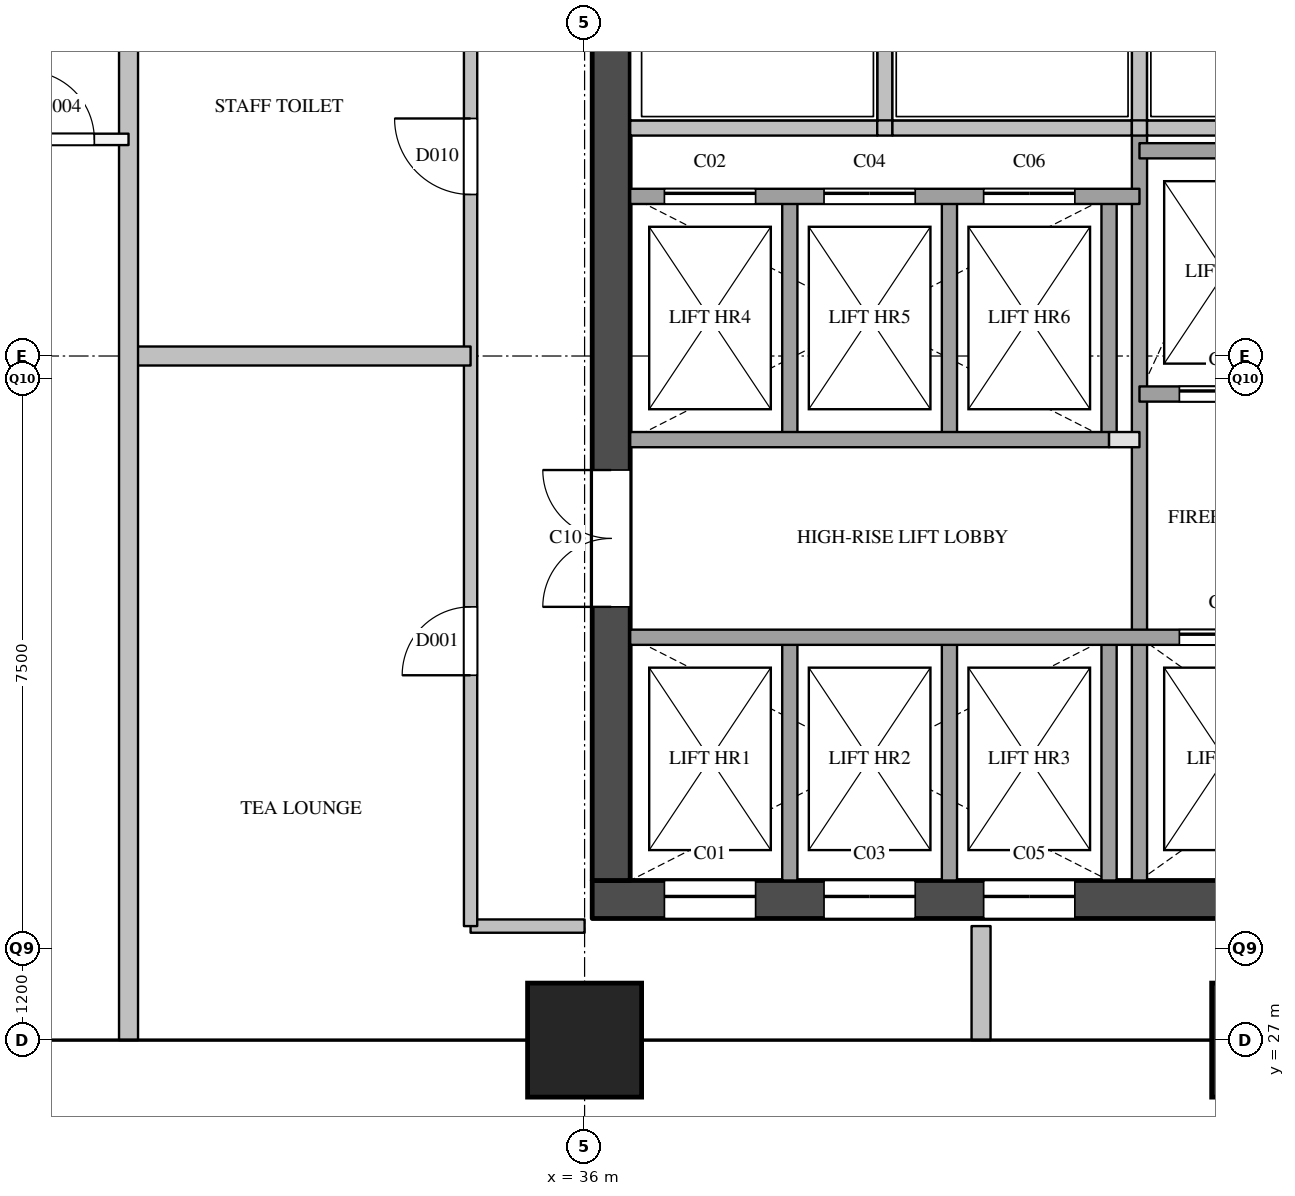
"""IFC4 building model, lengths in metres.
Left out: names, types, materials, properties, quantities, classifications, styles, units other than length and angle.
Written with IfcOpenShell. Run it as: python <this file> out.ifc"""

import sys

from ifc_helpers import new_model, si_unit, direction, frame, frame_2d, origin, origin_2d, place, context, subcontext, project, spatial, rectangle, extrude, element, fill, save


model = new_model("IFC4")
c1 = context("Model", 3, precision=1e-05, world=origin(), true_north=direction((0.0, 1.0)))
c2 = subcontext(c1, "Body", "Model", "MODEL_VIEW")
j1 = project(units=[si_unit("LENGTHUNIT", "METRE"), si_unit("PLANEANGLEUNIT", "RADIAN")], contexts=[c1])
p1 = place(None, origin())
s1 = spatial("IfcSite", under=j1, at=p1, CompositionType="ELEMENT")
p2 = place(p1, origin())
s2 = spatial("IfcBuilding", under=s1, at=p2, CompositionType="ELEMENT")
p3 = place(p2, frame((0.0, 0.0, 150.5)))
s3 = spatial("IfcBuildingStorey", under=s2, at=p3, CompositionType="ELEMENT", Elevation=150.5)
for number, where, z_axis, x_axis in (
    (1, (36.0, 27.0, 0.0), (0.0, 0.0, 1.0), (1.0, 0.0, 0.0)),
    (2, (45.0, 27.0, 0.0), (0.0, 0.0, 1.0), (1.0, 0.0, 0.0)),
):
    element("IfcColumn", number, at=place(p3, frame(where, z_axis=z_axis, x_axis=x_axis)), inside=s3, PredefinedType="COLUMN", context=c2, shape_type="SweptSolid", body=[
        extrude(rectangle(XDim=1.5, YDim=1.5, at=origin_2d()), origin(), (0.0, 0.0, 1.0), 3.9),
    ])
p4 = place(p3, frame((36.1, 28.85, 0.0), z_axis=(0.0, 0.0, 1.0), x_axis=(1.0, 0.0, 0.0)))
e3 = element("IfcWall", 3, at=p4, inside=s3, PredefinedType="SHEAR", context=c2, shape_type="SweptSolid", body=[
    extrude(rectangle(XDim=12.2, YDim=0.5, at=frame_2d((6.1, 0.0))), origin(), (0.0, 0.0, 1.0), 3.6),
])
p5 = place(p4, frame((0.95, 0.0, 0.0)))
e4 = element("IfcOpeningElement", 4, at=p5, cuts=e3, PredefinedType="OPENING", context=c2, shape_type="SweptSolid", body=[
    extrude(rectangle(XDim=1.2, YDim=2.1, at=frame_2d((0.6, 1.05))), frame((0.0, 0.26, 0.0), z_axis=(0.0, -1.0, 0.0), x_axis=(1.0, 0.0, 0.0)), (0.0, 0.0, 1.0), 0.52),
])
p6 = place(p4, frame((3.05, 0.0, 0.0)))
e5 = element("IfcOpeningElement", 5, at=p6, cuts=e3, PredefinedType="OPENING", context=c2, shape_type="SweptSolid", body=[
    extrude(rectangle(XDim=1.2, YDim=2.1, at=frame_2d((0.6, 1.05))), frame((0.0, 0.26, 0.0), z_axis=(0.0, -1.0, 0.0), x_axis=(1.0, 0.0, 0.0)), (0.0, 0.0, 1.0), 0.52),
])
p7 = place(p4, frame((5.15, 0.0, 0.0)))
e6 = element("IfcOpeningElement", 6, at=p7, cuts=e3, PredefinedType="OPENING", context=c2, shape_type="SweptSolid", body=[
    extrude(rectangle(XDim=1.2, YDim=2.1, at=frame_2d((0.6, 1.05))), frame((0.0, 0.26, 0.0), z_axis=(0.0, -1.0, 0.0), x_axis=(1.0, 0.0, 0.0)), (0.0, 0.0, 1.0), 0.52),
])
p8 = place(p3, frame((36.35, 29.1, 0.0), z_axis=(0.0, 0.0, 1.0), x_axis=(0.0, 1.0, 0.0)))
e7 = element("IfcWall", 7, at=p8, inside=s3, PredefinedType="SHEAR", context=c2, shape_type="SweptSolid", body=[
    extrude(rectangle(XDim=20.3, YDim=0.5, at=frame_2d((10.15, 0.0))), origin(), (0.0, 0.0, 1.0), 3.6),
])
p9 = place(p8, frame((3.6, 0.0, 0.0)))
e8 = element("IfcOpeningElement", 8, at=p9, cuts=e7, PredefinedType="OPENING", context=c2, shape_type="SweptSolid", body=[
    extrude(rectangle(XDim=1.8, YDim=2.1, at=frame_2d((0.9, 1.05))), frame((0.0, 0.26, 0.0), z_axis=(0.0, -1.0, 0.0), x_axis=(1.0, 0.0, 0.0)), (0.0, 0.0, 1.0), 0.52),
])
p10 = place(p8, frame((16.4, 0.0, 0.0)))
e9 = element("IfcOpeningElement", 9, at=p10, cuts=e7, PredefinedType="OPENING", context=c2, shape_type="SweptSolid", body=[
    extrude(rectangle(XDim=1.0, YDim=2.1, at=frame_2d((0.5, 1.05))), frame((0.0, 0.26, 0.0), z_axis=(0.0, -1.0, 0.0), x_axis=(1.0, 0.0, 0.0)), (0.0, 0.0, 1.0), 0.52),
])
p11 = place(p3, frame((38.7, 29.1, 0.0), z_axis=(0.0, 0.0, 1.0), x_axis=(0.0, 1.0, 0.0)))
e10 = element("IfcWall", 10, at=p11, inside=s3, PredefinedType="SOLIDWALL", context=c2, shape_type="SweptSolid", body=[
    extrude(rectangle(XDim=3.2, YDim=0.2, at=frame_2d((1.6, 0.0))), origin(), (0.0, 0.0, 1.0), 3.6),
])
p12 = place(p3, frame((38.7, 34.9, 0.0), z_axis=(0.0, 0.0, 1.0), x_axis=(0.0, 1.0, 0.0)))
e11 = element("IfcWall", 11, at=p12, inside=s3, PredefinedType="SOLIDWALL", context=c2, shape_type="SweptSolid", body=[
    extrude(rectangle(XDim=3.2, YDim=0.2, at=frame_2d((1.6, 0.0))), origin(), (0.0, 0.0, 1.0), 3.6),
])
p13 = place(p3, frame((39.95, 39.0, 0.0), z_axis=(0.0, 0.0, 1.0), x_axis=(0.0, 1.0, 0.0)))
e12 = element("IfcWall", 12, at=p13, inside=s3, PredefinedType="SOLIDWALL", context=c2, shape_type="SweptSolid", body=[
    extrude(rectangle(XDim=1.78, YDim=0.2, at=frame_2d((0.89, 0.0))), origin(), (0.0, 0.0, 1.0), 3.6),
])
p14 = place(p3, frame((40.8, 29.1, 0.0), z_axis=(0.0, 0.0, 1.0), x_axis=(0.0, 1.0, 0.0)))
e13 = element("IfcWall", 13, at=p14, inside=s3, PredefinedType="SOLIDWALL", context=c2, shape_type="SweptSolid", body=[
    extrude(rectangle(XDim=3.2, YDim=0.2, at=frame_2d((1.6, 0.0))), origin(), (0.0, 0.0, 1.0), 3.6),
])
p15 = place(p3, frame((40.8, 34.9, 0.0), z_axis=(0.0, 0.0, 1.0), x_axis=(0.0, 1.0, 0.0)))
e14 = element("IfcWall", 14, at=p15, inside=s3, PredefinedType="SOLIDWALL", context=c2, shape_type="SweptSolid", body=[
    extrude(rectangle(XDim=3.2, YDim=0.2, at=frame_2d((1.6, 0.0))), origin(), (0.0, 0.0, 1.0), 3.6),
])
p16 = place(p3, frame((42.9, 29.1, 0.0), z_axis=(0.0, 0.0, 1.0), x_axis=(0.0, 1.0, 0.0)))
e15 = element("IfcWall", 15, at=p16, inside=s3, PredefinedType="SOLIDWALL", context=c2, shape_type="SweptSolid", body=[
    extrude(rectangle(XDim=3.2, YDim=0.2, at=frame_2d((1.6, 0.0))), origin(), (0.0, 0.0, 1.0), 3.6),
])
p17 = place(p3, frame((42.9, 34.9, 0.0), z_axis=(0.0, 0.0, 1.0), x_axis=(0.0, 1.0, 0.0)))
e16 = element("IfcWall", 16, at=p17, inside=s3, PredefinedType="SOLIDWALL", context=c2, shape_type="SweptSolid", body=[
    extrude(rectangle(XDim=3.2, YDim=0.2, at=frame_2d((1.6, 0.0))), origin(), (0.0, 0.0, 1.0), 3.6),
])
p18 = place(p3, frame((43.3, 29.1, 0.0), z_axis=(0.0, 0.0, 1.0), x_axis=(0.0, 1.0, 0.0)))
e17 = element("IfcWall", 17, at=p18, inside=s3, PredefinedType="SOLIDWALL", context=c2, shape_type="SweptSolid", body=[
    extrude(rectangle(XDim=9.9, YDim=0.2, at=frame_2d((4.95, 0.0))), origin(), (0.0, 0.0, 1.0), 3.6),
])
p19 = place(p3, frame((43.3, 39.0, 0.0), z_axis=(0.0, 0.0, 1.0), x_axis=(0.0, 1.0, 0.0)))
e18 = element("IfcWall", 18, at=p19, inside=s3, PredefinedType="SOLIDWALL", context=c2, shape_type="SweptSolid", body=[
    extrude(rectangle(XDim=1.78, YDim=0.2, at=frame_2d((0.89, 0.0))), origin(), (0.0, 0.0, 1.0), 3.6),
])
p20 = place(p3, frame((36.6, 32.3, 0.0), z_axis=(0.0, 0.0, 1.0), x_axis=(1.0, 0.0, 0.0)))
e19 = element("IfcWall", 19, at=p20, inside=s3, PredefinedType="SOLIDWALL", context=c2, shape_type="SweptSolid", body=[
    extrude(rectangle(XDim=11.2, YDim=0.2, at=frame_2d((5.6, 0.0))), origin(), (0.0, 0.0, 1.0), 3.6),
])
p21 = place(p20, frame((7.225, 0.0, 0.0)))
e20 = element("IfcOpeningElement", 20, at=p21, cuts=e19, PredefinedType="OPENING", context=c2, shape_type="SweptSolid", body=[
    extrude(rectangle(XDim=1.2, YDim=2.1, at=frame_2d((0.6, 1.05))), frame((0.0, 0.11, 0.0), z_axis=(0.0, -1.0, 0.0), x_axis=(1.0, 0.0, 0.0)), (0.0, 0.0, 1.0), 0.22),
])
p22 = place(p20, frame((9.475, 0.0, 0.0)))
e21 = element("IfcOpeningElement", 21, at=p22, cuts=e19, PredefinedType="OPENING", context=c2, shape_type="SweptSolid", body=[
    extrude(rectangle(XDim=1.2, YDim=2.1, at=frame_2d((0.6, 1.05))), frame((0.0, 0.11, 0.0), z_axis=(0.0, -1.0, 0.0), x_axis=(1.0, 0.0, 0.0)), (0.0, 0.0, 1.0), 0.22),
])
p23 = place(p3, frame((42.9, 34.9, 0.0), z_axis=(0.0, 0.0, 1.0), x_axis=(1.0, 0.0, 0.0)))
e22 = element("IfcWall", 22, at=p23, inside=s3, PredefinedType="PARTITIONING", context=c2, shape_type="SweptSolid", body=[
    extrude(rectangle(XDim=0.4, YDim=0.2, at=frame_2d((0.2, 0.0))), origin(), (0.0, 0.0, 1.0), 3.6),
])
p24 = place(p3, frame((36.6, 34.9, 0.0), z_axis=(0.0, 0.0, 1.0), x_axis=(1.0, 0.0, 0.0)))
e23 = element("IfcWall", 23, at=p24, inside=s3, PredefinedType="SOLIDWALL", context=c2, shape_type="SweptSolid", body=[
    extrude(rectangle(XDim=6.3, YDim=0.2, at=frame_2d((3.15, 0.0))), origin(), (0.0, 0.0, 1.0), 3.6),
])
p25 = place(p3, frame((43.3, 35.5, 0.0), z_axis=(0.0, 0.0, 1.0), x_axis=(1.0, 0.0, 0.0)))
e24 = element("IfcWall", 24, at=p25, inside=s3, PredefinedType="SOLIDWALL", context=c2, shape_type="SweptSolid", body=[
    extrude(rectangle(XDim=4.5, YDim=0.2, at=frame_2d((2.25, 0.0))), origin(), (0.0, 0.0, 1.0), 3.6),
])
p26 = place(p25, frame((0.525, 0.0, 0.0)))
e25 = element("IfcOpeningElement", 25, at=p26, cuts=e24, PredefinedType="OPENING", context=c2, shape_type="SweptSolid", body=[
    extrude(rectangle(XDim=1.2, YDim=2.1, at=frame_2d((0.6, 1.05))), frame((0.0, 0.11, 0.0), z_axis=(0.0, -1.0, 0.0), x_axis=(1.0, 0.0, 0.0)), (0.0, 0.0, 1.0), 0.22),
])
p27 = place(p25, frame((3.025, 0.0, 0.0)))
e26 = element("IfcOpeningElement", 26, at=p27, cuts=e24, PredefinedType="OPENING", context=c2, shape_type="SweptSolid", body=[
    extrude(rectangle(XDim=0.7, YDim=2.1, at=frame_2d((0.35, 1.05))), frame((0.0, 0.11, 0.0), z_axis=(0.0, -1.0, 0.0), x_axis=(1.0, 0.0, 0.0)), (0.0, 0.0, 1.0), 0.22),
])
p28 = place(p3, frame((36.6, 38.1, 0.0), z_axis=(0.0, 0.0, 1.0), x_axis=(1.0, 0.0, 0.0)))
e27 = element("IfcWall", 27, at=p28, inside=s3, PredefinedType="SOLIDWALL", context=c2, shape_type="SweptSolid", body=[
    extrude(rectangle(XDim=6.7, YDim=0.2, at=frame_2d((3.35, 0.0))), origin(), (0.0, 0.0, 1.0), 3.6),
])
p29 = place(p28, frame((0.45, 0.0, 0.0)))
e28 = element("IfcOpeningElement", 28, at=p29, cuts=e27, PredefinedType="OPENING", context=c2, shape_type="SweptSolid", body=[
    extrude(rectangle(XDim=1.2, YDim=2.1, at=frame_2d((0.6, 1.05))), frame((0.0, 0.11, 0.0), z_axis=(0.0, -1.0, 0.0), x_axis=(1.0, 0.0, 0.0)), (0.0, 0.0, 1.0), 0.22),
])
p30 = place(p28, frame((2.55, 0.0, 0.0)))
e29 = element("IfcOpeningElement", 29, at=p30, cuts=e27, PredefinedType="OPENING", context=c2, shape_type="SweptSolid", body=[
    extrude(rectangle(XDim=1.2, YDim=2.1, at=frame_2d((0.6, 1.05))), frame((0.0, 0.11, 0.0), z_axis=(0.0, -1.0, 0.0), x_axis=(1.0, 0.0, 0.0)), (0.0, 0.0, 1.0), 0.22),
])
p31 = place(p28, frame((4.65, 0.0, 0.0)))
e30 = element("IfcOpeningElement", 30, at=p31, cuts=e27, PredefinedType="OPENING", context=c2, shape_type="SweptSolid", body=[
    extrude(rectangle(XDim=1.2, YDim=2.1, at=frame_2d((0.6, 1.05))), frame((0.0, 0.11, 0.0), z_axis=(0.0, -1.0, 0.0), x_axis=(1.0, 0.0, 0.0)), (0.0, 0.0, 1.0), 0.22),
])
p32 = place(p3, frame((43.3, 38.7, 0.0), z_axis=(0.0, 0.0, 1.0), x_axis=(1.0, 0.0, 0.0)))
e31 = element("IfcWall", 31, at=p32, inside=s3, PredefinedType="SOLIDWALL", context=c2, shape_type="SweptSolid", body=[
    extrude(rectangle(XDim=4.5, YDim=0.2, at=frame_2d((2.25, 0.0))), origin(), (0.0, 0.0, 1.0), 3.6),
])
p33 = place(p3, frame((36.6, 39.0, 0.0), z_axis=(0.0, 0.0, 1.0), x_axis=(1.0, 0.0, 0.0)))
e32 = element("IfcWall", 32, at=p33, inside=s3, PredefinedType="SOLIDWALL", context=c2, shape_type="SweptSolid", body=[
    extrude(rectangle(XDim=3.25, YDim=0.2, at=frame_2d((1.625, 0.0))), origin(), (0.0, 0.0, 1.0), 3.6),
])
p34 = place(p3, frame((39.85, 39.0, 0.0), z_axis=(0.0, 0.0, 1.0), x_axis=(1.0, 0.0, 0.0)))
e33 = element("IfcWall", 33, at=p34, inside=s3, PredefinedType="SOLIDWALL", context=c2, shape_type="SweptSolid", body=[
    extrude(rectangle(XDim=0.2, YDim=0.2, at=frame_2d((0.1, 0.0))), origin(), (0.0, 0.0, 1.0), 3.6),
])
p35 = place(p3, frame((40.05, 39.0, 0.0), z_axis=(0.0, 0.0, 1.0), x_axis=(1.0, 0.0, 0.0)))
e34 = element("IfcWall", 34, at=p35, inside=s3, PredefinedType="SOLIDWALL", context=c2, shape_type="SweptSolid", body=[
    extrude(rectangle(XDim=3.15, YDim=0.2, at=frame_2d((1.575, 0.0))), origin(), (0.0, 0.0, 1.0), 3.6),
])
p36 = place(p3, frame((43.2, 39.0, 0.0), z_axis=(0.0, 0.0, 1.0), x_axis=(1.0, 0.0, 0.0)))
e35 = element("IfcWall", 35, at=p36, inside=s3, PredefinedType="SOLIDWALL", context=c2, shape_type="SweptSolid", body=[
    extrude(rectangle(XDim=0.2, YDim=0.2, at=frame_2d((0.1, 0.0))), origin(), (0.0, 0.0, 1.0), 3.6),
])
p37 = place(p3, frame((43.4, 39.0, 0.0), z_axis=(0.0, 0.0, 1.0), x_axis=(1.0, 0.0, 0.0)))
e36 = element("IfcWall", 36, at=p37, inside=s3, PredefinedType="SOLIDWALL", context=c2, shape_type="SweptSolid", body=[
    extrude(rectangle(XDim=3.25, YDim=0.2, at=frame_2d((1.625, 0.0))), origin(), (0.0, 0.0, 1.0), 3.6),
])
p38 = place(p3, frame((34.5, 28.5, 0.0), z_axis=(0.0, 0.0, 1.0), x_axis=(1.0, 0.0, 0.0)))
e37 = element("IfcWall", 37, at=p38, inside=s3, PredefinedType="PARTITIONING", context=c2, shape_type="SweptSolid", body=[
    extrude(rectangle(XDim=1.5, YDim=0.175, at=frame_2d((0.75, 0.0))), origin(), (0.0, 0.0, 1.0), 3.6),
])
p39 = place(p3, frame((34.5, 28.5, 0.0), z_axis=(0.0, 0.0, 1.0), x_axis=(0.0, 1.0, 0.0)))
e38 = element("IfcWall", 38, at=p39, inside=s3, PredefinedType="PARTITIONING", context=c2, shape_type="SweptSolid", body=[
    extrude(rectangle(XDim=12.75, YDim=0.175, at=frame_2d((6.375, 0.0))), origin(), (0.0, 0.0, 1.0), 3.6),
])
p40 = place(p39, frame((3.3, 0.0, 0.0)))
e39 = element("IfcOpeningElement", 39, at=p40, cuts=e38, PredefinedType="OPENING", context=c2, shape_type="SweptSolid", body=[
    extrude(rectangle(XDim=0.9, YDim=2.1, at=frame_2d((0.45, 1.05))), frame((0.0, 0.097, 0.0), z_axis=(0.0, -1.0, 0.0), x_axis=(1.0, 0.0, 0.0)), (0.0, 0.0, 1.0), 0.195),
])
p41 = place(p39, frame((9.625, 0.0, 0.0)))
e40 = element("IfcOpeningElement", 40, at=p41, cuts=e38, PredefinedType="OPENING", context=c2, shape_type="SweptSolid", body=[
    extrude(rectangle(XDim=1.0, YDim=2.1, at=frame_2d((0.5, 1.05))), frame((0.0, 0.097, 0.0), z_axis=(0.0, -1.0, 0.0), x_axis=(1.0, 0.0, 0.0)), (0.0, 0.0, 1.0), 0.195),
])
p42 = place(p3, frame((28.2, 38.85, 0.0), z_axis=(0.0, 0.0, 1.0), x_axis=(1.0, 0.0, 0.0)))
e41 = element("IfcWall", 41, at=p42, inside=s3, PredefinedType="PARTITIONING", context=c2, shape_type="SweptSolid", body=[
    extrude(rectangle(XDim=1.8, YDim=0.15, at=frame_2d((0.9, 0.0))), origin(), (0.0, 0.0, 1.0), 3.6),
])
p43 = place(p42, frame((0.45, 0.0, 0.0)))
e42 = element("IfcOpeningElement", 42, at=p43, cuts=e41, PredefinedType="OPENING", context=c2, shape_type="SweptSolid", body=[
    extrude(rectangle(XDim=0.9, YDim=2.1, at=frame_2d((0.45, 1.05))), frame((0.0, 0.085, 0.0), z_axis=(0.0, -1.0, 0.0), x_axis=(1.0, 0.0, 0.0)), (0.0, 0.0, 1.0), 0.17),
])
p44 = place(p3, frame((30.0, 36.0, 0.0), z_axis=(0.0, 0.0, 1.0), x_axis=(1.0, 0.0, 0.0)))
e43 = element("IfcWall", 43, at=p44, inside=s3, PredefinedType="PARTITIONING", context=c2, shape_type="SweptSolid", body=[
    extrude(rectangle(XDim=4.5, YDim=0.25, at=frame_2d((2.25, 0.0))), origin(), (0.0, 0.0, 1.0), 3.6),
])
p45 = place(p3, frame((30.0, 27.0, 0.0), z_axis=(0.0, 0.0, 1.0), x_axis=(0.0, 1.0, 0.0)))
e44 = element("IfcWall", 44, at=p45, inside=s3, PredefinedType="PARTITIONING", context=c2, shape_type="SweptSolid", body=[
    extrude(rectangle(XDim=14.25, YDim=0.25, at=frame_2d((7.125, 0.0))), origin(), (0.0, 0.0, 1.0), 2.6),
])
p46 = place(p3, frame((41.216, 27.0, 0.0), z_axis=(0.0, 0.0, 1.0), x_axis=(0.0, 1.0, 0.0)))
e45 = element("IfcWall", 45, at=p46, inside=s3, PredefinedType="PARTITIONING", context=c2, shape_type="SweptSolid", body=[
    extrude(rectangle(XDim=1.5, YDim=0.25, at=frame_2d((0.75, 0.0))), origin(), (0.0, 0.0, 1.0), 2.6),
])
p47 = place(p5, origin())
e46 = element("IfcDoor", 46, at=p47, inside=s3, OperationType="SLIDING_TO_LEFT", PredefinedType="DOOR", context=c2, shape_type="SweptSolid", body=[
    extrude(rectangle(XDim=1.2, YDim=2.1, at=frame_2d((0.6, 1.05))), frame((0.0, 0.025, 0.0), z_axis=(0.0, -1.0, 0.0), x_axis=(1.0, 0.0, 0.0)), (0.0, 0.0, 1.0), 0.05),
])
fill(e4, e46)
p48 = place(p29, origin())
e47 = element("IfcDoor", 47, at=p48, inside=s3, OperationType="SLIDING_TO_LEFT", PredefinedType="DOOR", context=c2, shape_type="SweptSolid", body=[
    extrude(rectangle(XDim=1.2, YDim=2.1, at=frame_2d((0.6, 1.05))), frame((0.0, 0.025, 0.0), z_axis=(0.0, -1.0, 0.0), x_axis=(1.0, 0.0, 0.0)), (0.0, 0.0, 1.0), 0.05),
])
fill(e28, e47)
p49 = place(p6, origin())
e48 = element("IfcDoor", 48, at=p49, inside=s3, OperationType="SLIDING_TO_LEFT", PredefinedType="DOOR", context=c2, shape_type="SweptSolid", body=[
    extrude(rectangle(XDim=1.2, YDim=2.1, at=frame_2d((0.6, 1.05))), frame((0.0, 0.025, 0.0), z_axis=(0.0, -1.0, 0.0), x_axis=(1.0, 0.0, 0.0)), (0.0, 0.0, 1.0), 0.05),
])
fill(e5, e48)
p50 = place(p30, origin())
e49 = element("IfcDoor", 49, at=p50, inside=s3, OperationType="SLIDING_TO_LEFT", PredefinedType="DOOR", context=c2, shape_type="SweptSolid", body=[
    extrude(rectangle(XDim=1.2, YDim=2.1, at=frame_2d((0.6, 1.05))), frame((0.0, 0.025, 0.0), z_axis=(0.0, -1.0, 0.0), x_axis=(1.0, 0.0, 0.0)), (0.0, 0.0, 1.0), 0.05),
])
fill(e29, e49)
p51 = place(p7, origin())
e50 = element("IfcDoor", 50, at=p51, inside=s3, OperationType="SLIDING_TO_LEFT", PredefinedType="DOOR", context=c2, shape_type="SweptSolid", body=[
    extrude(rectangle(XDim=1.2, YDim=2.1, at=frame_2d((0.6, 1.05))), frame((0.0, 0.025, 0.0), z_axis=(0.0, -1.0, 0.0), x_axis=(1.0, 0.0, 0.0)), (0.0, 0.0, 1.0), 0.05),
])
fill(e6, e50)
p52 = place(p31, origin())
e51 = element("IfcDoor", 51, at=p52, inside=s3, OperationType="SLIDING_TO_LEFT", PredefinedType="DOOR", context=c2, shape_type="SweptSolid", body=[
    extrude(rectangle(XDim=1.2, YDim=2.1, at=frame_2d((0.6, 1.05))), frame((0.0, 0.025, 0.0), z_axis=(0.0, -1.0, 0.0), x_axis=(1.0, 0.0, 0.0)), (0.0, 0.0, 1.0), 0.05),
])
fill(e30, e51)
p53 = place(p21, origin())
e52 = element("IfcDoor", 52, at=p53, inside=s3, OperationType="SLIDING_TO_LEFT", PredefinedType="DOOR", context=c2, shape_type="SweptSolid", body=[
    extrude(rectangle(XDim=1.2, YDim=2.1, at=frame_2d((0.6, 1.05))), frame((0.0, 0.025, 0.0), z_axis=(0.0, -1.0, 0.0), x_axis=(1.0, 0.0, 0.0)), (0.0, 0.0, 1.0), 0.05),
])
fill(e20, e52)
p54 = place(p26, origin())
e53 = element("IfcDoor", 53, at=p54, inside=s3, OperationType="SLIDING_TO_LEFT", PredefinedType="DOOR", context=c2, shape_type="SweptSolid", body=[
    extrude(rectangle(XDim=1.2, YDim=2.1, at=frame_2d((0.6, 1.05))), frame((0.0, 0.025, 0.0), z_axis=(0.0, -1.0, 0.0), x_axis=(1.0, 0.0, 0.0)), (0.0, 0.0, 1.0), 0.05),
])
fill(e25, e53)
p55 = place(p9, origin())
e54 = element("IfcDoor", 54, at=p55, inside=s3, OperationType="DOUBLE_DOOR_SINGLE_SWING", PredefinedType="DOOR", context=c2, shape_type="SweptSolid", body=[
    extrude(rectangle(XDim=1.8, YDim=2.1, at=frame_2d((0.9, 1.05))), frame((0.0, 0.025, 0.0), z_axis=(0.0, -1.0, 0.0), x_axis=(1.0, 0.0, 0.0)), (0.0, 0.0, 1.0), 0.05),
])
fill(e8, e54)
p56 = place(p40, origin())
e55 = element("IfcDoor", 55, at=p56, inside=s3, OperationType="SINGLE_SWING_LEFT", PredefinedType="DOOR", context=c2, shape_type="SweptSolid", body=[
    extrude(rectangle(XDim=0.9, YDim=2.1, at=frame_2d((0.45, 1.05))), frame((0.0, 0.025, 0.0), z_axis=(0.0, -1.0, 0.0), x_axis=(1.0, 0.0, 0.0)), (0.0, 0.0, 1.0), 0.05),
])
fill(e39, e55)
p57 = place(p43, origin())
e56 = element("IfcDoor", 56, at=p57, inside=s3, OperationType="SINGLE_SWING_LEFT", PredefinedType="DOOR", context=c2, shape_type="SweptSolid", body=[
    extrude(rectangle(XDim=0.9, YDim=2.1, at=frame_2d((0.45, 1.05))), frame((0.0, 0.025, 0.0), z_axis=(0.0, -1.0, 0.0), x_axis=(1.0, 0.0, 0.0)), (0.0, 0.0, 1.0), 0.05),
])
fill(e42, e56)
p58 = place(p41, origin())
e57 = element("IfcDoor", 57, at=p58, inside=s3, OperationType="SINGLE_SWING_RIGHT", PredefinedType="DOOR", context=c2, shape_type="SweptSolid", body=[
    extrude(rectangle(XDim=1.0, YDim=2.1, at=frame_2d((0.5, 1.05))), frame((0.0, 0.025, 0.0), z_axis=(0.0, -1.0, 0.0), x_axis=(1.0, 0.0, 0.0)), (0.0, 0.0, 1.0), 0.05),
])
fill(e40, e57)
save(model, sys.argv[1])
